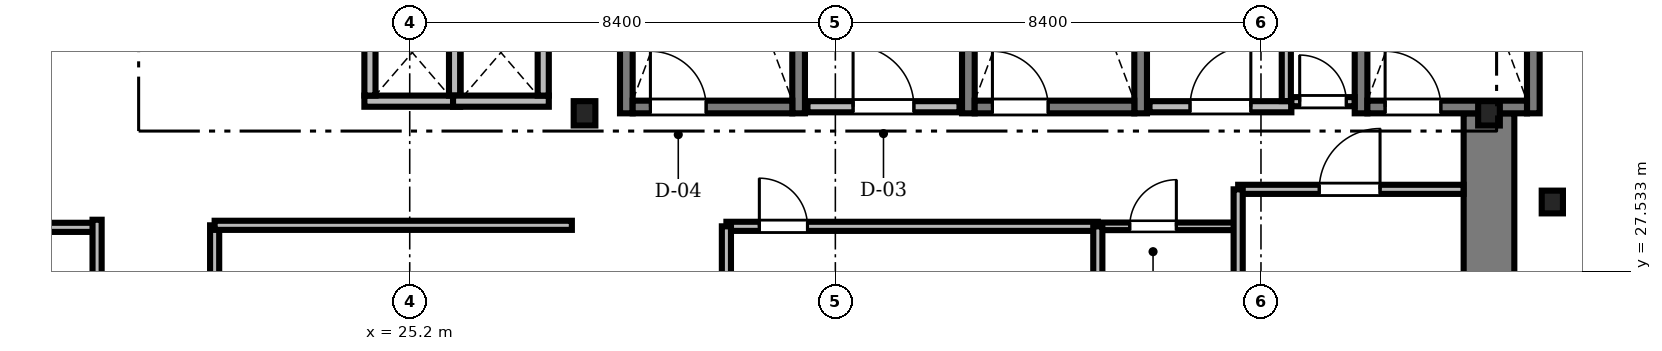
"""IFC4 building model, lengths in metres.
Left out: names, types, materials, properties, quantities, classifications, styles, units other than length and angle.
Written with IfcOpenShell. Run it as: python <this file> out.ifc"""

import sys

from ifc_helpers import new_model, si_unit, direction, frame, frame_2d, origin, origin_2d, place, context, subcontext, project, spatial, rectangle, i_section, extrude, source, transform, mapped, element, fill, save


model = new_model("IFC4")
c1 = context("Model", 3, precision=1e-05, world=origin(), true_north=direction((0.0, 1.0)))
c2 = subcontext(c1, "Body", "Model", "MODEL_VIEW")
j1 = project(units=[si_unit("LENGTHUNIT", "METRE"), si_unit("PLANEANGLEUNIT", "RADIAN")], contexts=[c1])
p1 = place(None, origin())
s1 = spatial("IfcSite", under=j1, at=p1, CompositionType="ELEMENT")
p2 = place(p1, origin())
s2 = spatial("IfcBuilding", under=s1, at=p2, CompositionType="ELEMENT")
p3 = place(p2, frame((0.0, 0.0, 49.5)))
s3 = spatial("IfcBuildingStorey", under=s2, at=p3, CompositionType="ELEMENT", Elevation=49.5)
m1 = source(origin(), c2, "Body", "SweptSolid", [
    extrude(rectangle(XDim=13.15, YDim=1.0, at=frame_2d((6.575, 0.0))), origin(), (0.0, 0.0, 1.0), 3.41),
])
p4 = place(p3, frame((46.5, 17.5, 0.0), z_axis=(0.0, 0.0, 1.0), x_axis=(0.0, 1.0, 0.0)))
e1 = element("IfcWall", 1, at=p4, inside=s3, PredefinedType="SHEAR", context=c2, shape_type="MappedRepresentation", body=[
    mapped(m1, transform((0.0, 0.0, 0.0), scale=1.0)),
])
m2 = source(origin(), c2, "Body", "SweptSolid", [
    extrude(i_section(OverallWidth=0.428, OverallDepth=0.481, WebThickness=0.04, FlangeThickness=0.063, FilletRadius=0.015, at=origin_2d()), origin(), (0.0, 0.0, 1.0), 3.41),
])
for number, where, z_axis, x_axis in (
    (2, (28.65, 30.65, 0.0), (0.0, 0.0, 1.0), (1.0, 0.0, 0.0)),
    (3, (46.5, 30.65, 0.0), (0.0, 0.0, 1.0), (1.0, 0.0, 0.0)),
):
    element("IfcColumn", number, at=place(p3, frame(where, z_axis=z_axis, x_axis=x_axis)), inside=s3, PredefinedType="COLUMN", context=c2, shape_type="MappedRepresentation", body=[
        mapped(m2, transform((0.0, 0.0, 0.0), scale=1.0)),
    ])
m3 = source(origin(), c2, "Body", "SweptSolid", [
    extrude(i_section(OverallWidth=0.419, OverallDepth=0.449, WebThickness=0.031, FlangeThickness=0.048, FilletRadius=0.015, at=origin_2d()), origin(), (0.0, 0.0, 1.0), 3.41),
])
p5 = place(p3, frame((47.75, 28.9, 0.0), z_axis=(0.0, 0.0, 1.0), x_axis=(1.0, 0.0, 0.0)))
e4 = element("IfcColumn", 4, at=p5, inside=s3, PredefinedType="COLUMN", context=c2, shape_type="MappedRepresentation", body=[
    mapped(m3, transform((0.0, 0.0, 0.0), scale=1.0)),
])
m4 = source(origin(), c2, "Body", "SweptSolid", [
    extrude(rectangle(XDim=9.15, YDim=0.25, at=frame_2d((4.575, 0.0))), origin(), (0.0, 0.0, 1.0), 3.45),
])
for number, where, z_axis, x_axis in (
    (5, (29.475, 30.65, 0.0), (0.0, 0.0, 1.0), (0.0, 1.0, 0.0)),
    (6, (32.875, 30.65, 0.0), (0.0, 0.0, 1.0), (0.0, 1.0, 0.0)),
):
    element("IfcWall", number, at=place(p3, frame(where, z_axis=z_axis, x_axis=x_axis)), inside=s3, PredefinedType="SOLIDWALL", context=c2, shape_type="MappedRepresentation", body=[
        mapped(m4, transform((0.0, 0.0, 0.0), scale=1.0)),
    ])
m5 = source(origin(), c2, "Body", "SweptSolid", [
    extrude(rectangle(XDim=3.15, YDim=0.25, at=frame_2d((1.575, 0.0))), origin(), (0.0, 0.0, 1.0), 3.45),
])
p6 = place(p3, frame((29.6, 30.775, 0.0), z_axis=(0.0, 0.0, 1.0), x_axis=(1.0, 0.0, 0.0)))
e7 = element("IfcWall", 7, at=p6, inside=s3, PredefinedType="SOLIDWALL", context=c2, shape_type="MappedRepresentation", body=[
    mapped(m5, transform((0.0, 0.0, 0.0), scale=1.0)),
])
m6 = source(origin(), c2, "Body", "SweptSolid", [
    extrude(rectangle(XDim=1.1, YDim=2.2, at=frame_2d((0.55, 1.1))), frame((0.0, 0.135, 0.0), z_axis=(0.0, -1.0, 0.0), x_axis=(1.0, 0.0, 0.0)), (0.0, 0.0, 1.0), 0.27),
])
p7 = place(p6, frame((0.35, 0.0, 0.0)))
e8 = element("IfcOpeningElement", 8, at=p7, cuts=e7, PredefinedType="OPENING", context=c2, shape_type="MappedRepresentation", body=[
    mapped(m6, transform((0.0, 0.0, 0.0), scale=1.0)),
])
for number, where, z_axis, x_axis in (
    (9, (36.225, 30.65, 0.0), (0.0, 0.0, 1.0), (0.0, 1.0, 0.0)),
    (10, (39.625, 30.65, 0.0), (0.0, 0.0, 1.0), (0.0, 1.0, 0.0)),
):
    element("IfcWall", number, at=place(p3, frame(where, z_axis=z_axis, x_axis=x_axis)), inside=s3, PredefinedType="SOLIDWALL", context=c2, shape_type="MappedRepresentation", body=[
        mapped(m4, transform((0.0, 0.0, 0.0), scale=1.0)),
    ])
p8 = place(p3, frame((36.35, 30.775, 0.0), z_axis=(0.0, 0.0, 1.0), x_axis=(1.0, 0.0, 0.0)))
e11 = element("IfcWall", 11, at=p8, inside=s3, PredefinedType="SOLIDWALL", context=c2, shape_type="MappedRepresentation", body=[
    mapped(m5, transform((0.0, 0.0, 0.0), scale=1.0)),
])
p9 = place(p8, frame((0.35, 0.0, 0.0)))
e12 = element("IfcOpeningElement", 12, at=p9, cuts=e11, PredefinedType="OPENING", context=c2, shape_type="MappedRepresentation", body=[
    mapped(m6, transform((0.0, 0.0, 0.0), scale=1.0)),
])
for number, where, z_axis, x_axis in (
    (13, (43.975, 30.65, 0.0), (0.0, 0.0, 1.0), (0.0, 1.0, 0.0)),
    (14, (47.375, 30.65, 0.0), (0.0, 0.0, 1.0), (0.0, 1.0, 0.0)),
):
    element("IfcWall", number, at=place(p3, frame(where, z_axis=z_axis, x_axis=x_axis)), inside=s3, PredefinedType="SOLIDWALL", context=c2, shape_type="MappedRepresentation", body=[
        mapped(m4, transform((0.0, 0.0, 0.0), scale=1.0)),
    ])
p10 = place(p3, frame((44.1, 30.775, 0.0), z_axis=(0.0, 0.0, 1.0), x_axis=(1.0, 0.0, 0.0)))
e15 = element("IfcWall", 15, at=p10, inside=s3, PredefinedType="SOLIDWALL", context=c2, shape_type="MappedRepresentation", body=[
    mapped(m5, transform((0.0, 0.0, 0.0), scale=1.0)),
])
p11 = place(p10, frame((0.35, 0.0, 0.0)))
e16 = element("IfcOpeningElement", 16, at=p11, cuts=e15, PredefinedType="OPENING", context=c2, shape_type="MappedRepresentation", body=[
    mapped(m6, transform((0.0, 0.0, 0.0), scale=1.0)),
])
m7 = source(origin(), c2, "Body", "SweptSolid", [
    extrude(rectangle(XDim=3.0, YDim=0.22, at=frame_2d((1.5, 0.0))), origin(), (0.0, 0.0, 1.0), 3.41),
])
p12 = place(p3, frame((33.05, 30.78, 0.0), z_axis=(0.0, 0.0, 1.0), x_axis=(1.0, 0.0, 0.0)))
e17 = element("IfcWall", 17, at=p12, inside=s3, PredefinedType="SOLIDWALL", context=c2, shape_type="MappedRepresentation", body=[
    mapped(m7, transform((0.0, 0.0, 0.0), scale=1.0)),
])
m8 = source(origin(), c2, "Body", "SweptSolid", [
    extrude(rectangle(XDim=1.2, YDim=2.2, at=frame_2d((0.6, 1.1))), frame((0.0, 0.12, 0.0), z_axis=(0.0, -1.0, 0.0), x_axis=(1.0, 0.0, 0.0)), (0.0, 0.0, 1.0), 0.24),
])
p13 = place(p12, frame((0.9, 0.0, 0.0)))
e18 = element("IfcOpeningElement", 18, at=p13, cuts=e17, PredefinedType="OPENING", context=c2, shape_type="MappedRepresentation", body=[
    mapped(m8, transform((0.0, 0.0, 0.0), scale=1.0)),
])
m9 = source(origin(), c2, "Body", "SweptSolid", [
    extrude(rectangle(XDim=2.8, YDim=0.22, at=frame_2d((1.4, 0.0))), origin(), (0.0, 0.0, 1.0), 3.41),
])
p14 = place(p3, frame((39.8, 30.78, 0.0), z_axis=(0.0, 0.0, 1.0), x_axis=(1.0, 0.0, 0.0)))
e19 = element("IfcWall", 19, at=p14, inside=s3, PredefinedType="SOLIDWALL", context=c2, shape_type="MappedRepresentation", body=[
    mapped(m9, transform((0.0, 0.0, 0.0), scale=1.0)),
])
p15 = place(p14, frame((0.8, 0.0, 0.0)))
e20 = element("IfcOpeningElement", 20, at=p15, cuts=e19, PredefinedType="OPENING", context=c2, shape_type="MappedRepresentation", body=[
    mapped(m8, transform((0.0, 0.0, 0.0), scale=1.0)),
])
m10 = source(origin(), c2, "Body", "SweptSolid", [
    extrude(rectangle(XDim=1.89, YDim=0.22, at=frame_2d((0.945, 0.0))), origin(), (0.0, 0.0, 1.0), 3.41),
])
p16 = place(p3, frame((24.305, 30.89, 0.0), z_axis=(0.0, 0.0, 1.0), x_axis=(1.0, 0.0, 0.0)))
e21 = element("IfcWall", 21, at=p16, inside=s3, PredefinedType="SOLIDWALL", context=c2, shape_type="MappedRepresentation", body=[
    mapped(m10, transform((0.0, 0.0, 0.0), scale=1.0)),
])
m11 = source(origin(), c2, "Body", "SweptSolid", [
    extrude(rectangle(XDim=1.7, YDim=0.22, at=frame_2d((0.85, 0.0))), origin(), (0.0, 0.0, 1.0), 3.41),
])
for number, where, z_axis, x_axis in (
    (22, (24.415, 31.0, 0.0), (0.0, 0.0, 1.0), (0.0, 1.0, 0.0)),
    (23, (26.085, 31.0, 0.0), (0.0, 0.0, 1.0), (0.0, 1.0, 0.0)),
):
    element("IfcWall", number, at=place(p3, frame(where, z_axis=z_axis, x_axis=x_axis)), inside=s3, PredefinedType="SOLIDWALL", context=c2, shape_type="MappedRepresentation", body=[
        mapped(m11, transform((0.0, 0.0, 0.0), scale=1.0)),
    ])
p17 = place(p3, frame((26.055, 30.89, 0.0), z_axis=(0.0, 0.0, 1.0), x_axis=(1.0, 0.0, 0.0)))
e24 = element("IfcWall", 24, at=p17, inside=s3, PredefinedType="SOLIDWALL", context=c2, shape_type="MappedRepresentation", body=[
    mapped(m10, transform((0.0, 0.0, 0.0), scale=1.0)),
])
p18 = place(p3, frame((27.835, 31.0, 0.0), z_axis=(0.0, 0.0, 1.0), x_axis=(0.0, 1.0, 0.0)))
e25 = element("IfcWall", 25, at=p18, inside=s3, PredefinedType="SOLIDWALL", context=c2, shape_type="MappedRepresentation", body=[
    mapped(m11, transform((0.0, 0.0, 0.0), scale=1.0)),
])
m12 = source(origin(), c2, "Body", "SweptSolid", [
    extrude(rectangle(XDim=11.94, YDim=0.18, at=frame_2d((5.97, 0.0))), origin(), (0.0, 0.0, 1.0), 2.802),
])
p19 = place(p3, frame((21.35, 16.5, 0.0), z_axis=(0.0, 0.0, 1.0), x_axis=(0.0, 1.0, 0.0)))
e26 = element("IfcWall", 26, at=p19, inside=s3, PredefinedType="PARTITIONING", context=c2, shape_type="MappedRepresentation", body=[
    mapped(m12, transform((0.0, 0.0, 0.0), scale=1.0)),
])
m13 = source(origin(), c2, "Body", "SweptSolid", [
    extrude(rectangle(XDim=1.05, YDim=2.2, at=frame_2d((0.525, 1.1))), frame((0.0, 0.1, 0.0), z_axis=(0.0, -1.0, 0.0), x_axis=(1.0, 0.0, 0.0)), (0.0, 0.0, 1.0), 0.2),
])
p20 = place(p19, frame((4.5, 0.0, 0.0)))
e27 = element("IfcOpeningElement", 27, at=p20, cuts=e26, PredefinedType="OPENING", context=c2, shape_type="MappedRepresentation", body=[
    mapped(m13, transform((0.0, 0.0, 0.0), scale=1.0)),
])
m14 = source(origin(), c2, "Body", "SweptSolid", [
    extrude(rectangle(XDim=7.33, YDim=0.18, at=frame_2d((3.665, 0.0))), origin(), (0.0, 0.0, 1.0), 3.042),
])
p21 = place(p3, frame((31.45, 28.42, 0.0), z_axis=(0.0, 0.0, 1.0), x_axis=(1.0, 0.0, 0.0)))
e28 = element("IfcWall", 28, at=p21, inside=s3, PredefinedType="PARTITIONING", context=c2, shape_type="MappedRepresentation", body=[
    mapped(m14, transform((0.0, 0.0, 0.0), scale=1.0)),
])
m15 = source(origin(), c2, "Body", "SweptSolid", [
    extrude(rectangle(XDim=0.95, YDim=2.15, at=frame_2d((0.475, 1.075))), frame((0.0, 0.1, 0.0), z_axis=(0.0, -1.0, 0.0), x_axis=(1.0, 0.0, 0.0)), (0.0, 0.0, 1.0), 0.2),
])
p22 = place(p21, frame((0.65, 0.0, 0.0)))
e29 = element("IfcOpeningElement", 29, at=p22, cuts=e28, PredefinedType="OPENING", context=c2, shape_type="MappedRepresentation", body=[
    mapped(m15, transform((0.0, 0.0, 0.0), scale=1.0)),
])
m16 = source(origin(), c2, "Body", "SweptSolid", [
    extrude(rectangle(XDim=4.448, YDim=0.18, at=frame_2d((2.224, 0.0))), origin(), (0.0, 0.0, 1.0), 3.042),
])
p23 = place(p3, frame((41.55, 29.15, 0.0), z_axis=(0.0, 0.0, 1.0), x_axis=(1.0, 0.0, 0.0)))
e30 = element("IfcWall", 30, at=p23, inside=s3, PredefinedType="PARTITIONING", context=c2, shape_type="MappedRepresentation", body=[
    mapped(m16, transform((0.0, 0.0, 0.0), scale=1.0)),
])
m17 = source(origin(), c2, "Body", "SweptSolid", [
    extrude(rectangle(XDim=1.2, YDim=2.2, at=frame_2d((0.6, 1.1))), frame((0.0, 0.1, 0.0), z_axis=(0.0, -1.0, 0.0), x_axis=(1.0, 0.0, 0.0)), (0.0, 0.0, 1.0), 0.2),
])
p24 = place(p23, frame((1.6, 0.0, 0.0)))
e31 = element("IfcOpeningElement", 31, at=p24, cuts=e30, PredefinedType="OPENING", context=c2, shape_type="MappedRepresentation", body=[
    mapped(m17, transform((0.0, 0.0, 0.0), scale=1.0)),
])
m18 = source(origin(), c2, "Body", "SweptSolid", [
    extrude(rectangle(XDim=2.74, YDim=0.15, at=frame_2d((1.37, 0.0))), origin(), (0.0, 0.0, 1.0), 3.41),
])
p25 = place(p3, frame((38.78, 28.42, 0.0), z_axis=(0.0, 0.0, 1.0), x_axis=(1.0, 0.0, 0.0)))
e32 = element("IfcWall", 32, at=p25, inside=s3, PredefinedType="PARTITIONING", context=c2, shape_type="MappedRepresentation", body=[
    mapped(m18, transform((0.0, 0.0, 0.0), scale=1.0)),
])
m19 = source(origin(), c2, "Body", "SweptSolid", [
    extrude(rectangle(XDim=0.92, YDim=2.1, at=frame_2d((0.46, 1.05))), frame((0.0, 0.085, 0.0), z_axis=(0.0, -1.0, 0.0), x_axis=(1.0, 0.0, 0.0)), (0.0, 0.0, 1.0), 0.17),
])
p26 = place(p25, frame((0.63, 0.0, 0.0)))
e33 = element("IfcOpeningElement", 33, at=p26, cuts=e32, PredefinedType="OPENING", context=c2, shape_type="MappedRepresentation", body=[
    mapped(m19, transform((0.0, 0.0, 0.0), scale=1.0)),
])
m20 = source(origin(), c2, "Body", "SweptSolid", [
    extrude(rectangle(XDim=1.248, YDim=0.18, at=frame_2d((0.624, 0.0))), origin(), (0.0, 0.0, 1.0), 3.41),
])
p27 = place(p3, frame((42.6, 30.88, 0.0), z_axis=(0.0, 0.0, 1.0), x_axis=(1.0, 0.0, 0.0)))
e34 = element("IfcWall", 34, at=p27, inside=s3, PredefinedType="PARTITIONING", context=c2, shape_type="MappedRepresentation", body=[
    mapped(m20, transform((0.0, 0.0, 0.0), scale=1.0)),
])
m21 = source(origin(), c2, "Body", "SweptSolid", [
    extrude(rectangle(XDim=0.92, YDim=2.1, at=frame_2d((0.46, 1.05))), frame((0.0, 0.1, 0.0), z_axis=(0.0, -1.0, 0.0), x_axis=(1.0, 0.0, 0.0)), (0.0, 0.0, 1.0), 0.2),
])
p28 = place(p27, frame((0.164, 0.0, 0.0)))
e35 = element("IfcOpeningElement", 35, at=p28, cuts=e34, PredefinedType="OPENING", context=c2, shape_type="MappedRepresentation", body=[
    mapped(m21, transform((0.0, 0.0, 0.0), scale=1.0)),
])
m22 = source(origin(), c2, "Body", "SweptSolid", [
    extrude(rectangle(XDim=16.8, YDim=0.18, at=frame_2d((8.4, 0.0))), origin(), (0.0, 0.0, 1.0), 2.652),
])
p29 = place(p3, frame((2.23, 28.4, 0.0), z_axis=(0.0, 0.0, 1.0), x_axis=(1.0, 0.0, 0.0)))
e36 = element("IfcWall", 36, at=p29, inside=s3, PredefinedType="PARTITIONING", context=c2, shape_type="MappedRepresentation", body=[
    mapped(m22, transform((0.0, 0.0, 0.0), scale=1.0)),
])
m23 = source(origin(), c2, "Body", "SweptSolid", [
    extrude(rectangle(XDim=13.79, YDim=0.18, at=frame_2d((6.895, 0.0))), origin(), (0.0, 0.0, 1.0), 2.802),
])
p30 = place(p3, frame((19.03, 14.76, 0.0), z_axis=(0.0, 0.0, 1.0), x_axis=(0.0, 1.0, 0.0)))
e37 = element("IfcWall", 37, at=p30, inside=s3, PredefinedType="PARTITIONING", context=c2, shape_type="MappedRepresentation", body=[
    mapped(m23, transform((0.0, 0.0, 0.0), scale=1.0)),
])
m24 = source(origin(), c2, "Body", "SweptSolid", [
    extrude(rectangle(XDim=7.05, YDim=0.18, at=frame_2d((3.525, 0.0))), origin(), (0.0, 0.0, 1.0), 3.41),
])
p31 = place(p3, frame((21.35, 28.44, 0.0), z_axis=(0.0, 0.0, 1.0), x_axis=(1.0, 0.0, 0.0)))
e38 = element("IfcWall", 38, at=p31, inside=s3, PredefinedType="PARTITIONING", context=c2, shape_type="MappedRepresentation", body=[
    mapped(m24, transform((0.0, 0.0, 0.0), scale=1.0)),
])
m25 = source(origin(), c2, "Body", "SweptSolid", [
    extrude(rectangle(XDim=2.758, YDim=0.18, at=frame_2d((1.379, 0.0))), origin(), (0.0, 0.0, 1.0), 3.41),
])
p32 = place(p3, frame((42.5, 30.892, 0.0), z_axis=(0.0, 0.0, 1.0), x_axis=(0.0, 1.0, 0.0)))
e39 = element("IfcWall", 39, at=p32, inside=s3, PredefinedType="PARTITIONING", context=c2, shape_type="MappedRepresentation", body=[
    mapped(m25, transform((0.0, 0.0, 0.0), scale=1.0)),
])
m26 = source(origin(), c2, "Body", "SweptSolid", [
    extrude(rectangle(XDim=2.35, YDim=0.18, at=frame_2d((1.175, 0.0))), origin(), (0.0, 0.0, 1.0), 2.802),
])
p33 = place(p3, frame((41.55, 26.8, 0.0), z_axis=(0.0, 0.0, 1.0), x_axis=(0.0, 1.0, 0.0)))
e40 = element("IfcWall", 40, at=p33, inside=s3, PredefinedType="PARTITIONING", context=c2, shape_type="MappedRepresentation", body=[
    mapped(m26, transform((0.0, 0.0, 0.0), scale=1.0)),
])
m27 = source(origin(), c2, "Body", "SweptSolid", [
    extrude(rectangle(XDim=1.6, YDim=0.18, at=frame_2d((0.8, 0.0))), origin(), (0.0, 0.0, 1.0), 2.952),
])
for number, where, z_axis, x_axis in (
    (41, (31.45, 26.82, 0.0), (0.0, 0.0, 1.0), (0.0, 1.0, 0.0)),
    (42, (38.78, 26.82, 0.0), (0.0, 0.0, 1.0), (0.0, 1.0, 0.0)),
):
    element("IfcWall", number, at=place(p3, frame(where, z_axis=z_axis, x_axis=x_axis)), inside=s3, PredefinedType="PARTITIONING", context=c2, shape_type="MappedRepresentation", body=[
        mapped(m27, transform((0.0, 0.0, 0.0), scale=1.0)),
    ])
m28 = source(origin(), c2, "Body", "SweptSolid", [
    extrude(rectangle(XDim=1.1, YDim=2.2, at=frame_2d((0.55, 1.1))), frame((0.0, 0.025, 0.0), z_axis=(0.0, -1.0, 0.0), x_axis=(1.0, 0.0, 0.0)), (0.0, 0.0, 1.0), 0.05),
])
p34 = place(p7, origin())
e43 = element("IfcDoor", 43, at=p34, inside=s3, OperationType="SINGLE_SWING_LEFT", PredefinedType="DOOR", context=c2, shape_type="MappedRepresentation", body=[
    mapped(m28, transform((0.0, 0.0, 0.0), scale=1.0)),
])
fill(e8, e43)
p35 = place(p9, origin())
e44 = element("IfcDoor", 44, at=p35, inside=s3, OperationType="SINGLE_SWING_LEFT", PredefinedType="DOOR", context=c2, shape_type="MappedRepresentation", body=[
    mapped(m28, transform((0.0, 0.0, 0.0), scale=1.0)),
])
fill(e12, e44)
p36 = place(p11, origin())
e45 = element("IfcDoor", 45, at=p36, inside=s3, OperationType="SINGLE_SWING_LEFT", PredefinedType="DOOR", context=c2, shape_type="MappedRepresentation", body=[
    mapped(m28, transform((0.0, 0.0, 0.0), scale=1.0)),
])
fill(e16, e45)
m29 = source(origin(), c2, "Body", "SweptSolid", [
    extrude(rectangle(XDim=1.2, YDim=2.2, at=frame_2d((0.6, 1.1))), frame((0.0, 0.025, 0.0), z_axis=(0.0, -1.0, 0.0), x_axis=(1.0, 0.0, 0.0)), (0.0, 0.0, 1.0), 0.05),
])
p37 = place(p13, origin())
e46 = element("IfcDoor", 46, at=p37, inside=s3, OperationType="SINGLE_SWING_LEFT", PredefinedType="DOOR", context=c2, shape_type="MappedRepresentation", body=[
    mapped(m29, transform((0.0, 0.0, 0.0), scale=1.0)),
])
fill(e18, e46)
p38 = place(p15, origin())
e47 = element("IfcDoor", 47, at=p38, inside=s3, OperationType="SINGLE_SWING_RIGHT", PredefinedType="DOOR", context=c2, shape_type="MappedRepresentation", body=[
    mapped(m29, transform((0.0, 0.0, 0.0), scale=1.0)),
])
fill(e20, e47)
m30 = source(origin(), c2, "Body", "SweptSolid", [
    extrude(rectangle(XDim=0.95, YDim=2.15, at=frame_2d((0.475, 1.075))), frame((0.0, 0.025, 0.0), z_axis=(0.0, -1.0, 0.0), x_axis=(1.0, 0.0, 0.0)), (0.0, 0.0, 1.0), 0.05),
])
p39 = place(p22, origin())
e48 = element("IfcDoor", 48, at=p39, inside=s3, OperationType="SINGLE_SWING_LEFT", PredefinedType="DOOR", context=c2, shape_type="MappedRepresentation", body=[
    mapped(m30, transform((0.0, 0.0, 0.0), scale=1.0)),
])
fill(e29, e48)
p40 = place(p24, origin())
e49 = element("IfcDoor", 49, at=p40, inside=s3, OperationType="SINGLE_SWING_RIGHT", PredefinedType="DOOR", context=c2, shape_type="MappedRepresentation", body=[
    mapped(m29, transform((0.0, 0.0, 0.0), scale=1.0)),
])
fill(e31, e49)
m31 = source(origin(), c2, "Body", "SweptSolid", [
    extrude(rectangle(XDim=0.92, YDim=2.1, at=frame_2d((0.46, 1.05))), frame((0.0, 0.025, 0.0), z_axis=(0.0, -1.0, 0.0), x_axis=(1.0, 0.0, 0.0)), (0.0, 0.0, 1.0), 0.05),
])
p41 = place(p26, origin())
e50 = element("IfcDoor", 50, at=p41, inside=s3, OperationType="SINGLE_SWING_RIGHT", PredefinedType="DOOR", context=c2, shape_type="MappedRepresentation", body=[
    mapped(m31, transform((0.0, 0.0, 0.0), scale=1.0)),
])
fill(e33, e50)
p42 = place(p28, origin())
e51 = element("IfcDoor", 51, at=p42, inside=s3, OperationType="SINGLE_SWING_LEFT", PredefinedType="DOOR", context=c2, shape_type="MappedRepresentation", body=[
    mapped(m31, transform((0.0, 0.0, 0.0), scale=1.0)),
])
fill(e35, e51)
save(model, sys.argv[1])
